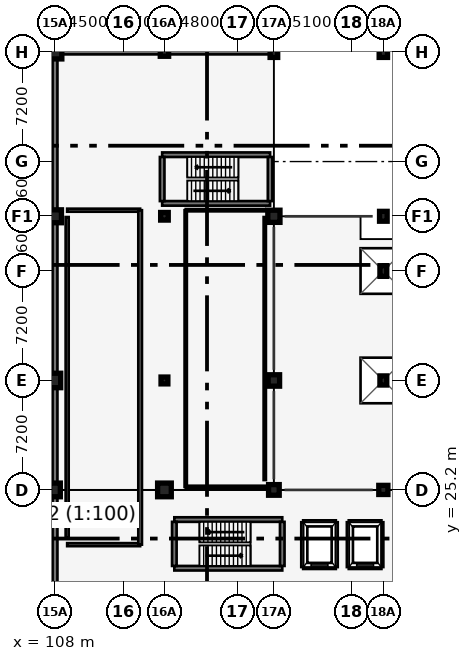
"""IFC4 building model, lengths in metres.
Left out: names, types, materials, properties, quantities, classifications, styles, units other than length and angle.
Written with IfcOpenShell. Run it as: python <this file> out.ifc"""

import sys

from ifc_helpers import new_model, si_unit, direction, frame, frame_2d, origin, origin_2d, place, context, subcontext, project, spatial, rectangle, circle, extrude, element, fill, save


model = new_model("IFC4")
c1 = context("Model", 3, precision=1e-05, world=origin(), true_north=direction((0.0, 1.0)))
c2 = subcontext(c1, "Body", "Model", "MODEL_VIEW")
j1 = project(units=[si_unit("LENGTHUNIT", "METRE"), si_unit("PLANEANGLEUNIT", "RADIAN")], contexts=[c1])
p1 = place(None, origin())
s1 = spatial("IfcSite", under=j1, at=p1, CompositionType="ELEMENT")
p2 = place(p1, origin())
s2 = spatial("IfcBuilding", under=s1, at=p2, CompositionType="ELEMENT")
p3 = place(p2, origin())
s3 = spatial("IfcBuildingStorey", under=s2, at=p3, CompositionType="ELEMENT", Elevation=0.0)
p4 = place(p3, frame((108.0, 25.2, 0.0), z_axis=(0.0, 0.0, 1.0), x_axis=(1.0, 0.0, 0.0)))
e1 = element("IfcColumn", 1, at=p4, inside=s3, PredefinedType="COLUMN", context=c2, shape_type="SweptSolid", body=[
    extrude(rectangle(XDim=0.7, YDim=0.9, at=origin_2d()), origin(), (0.0, 0.0, 1.0), 4.8),
])
p5 = place(p3, frame((108.0, 32.4, 0.0), z_axis=(0.0, 0.0, 1.0), x_axis=(1.0, 0.0, 0.0)))
e2 = element("IfcColumn", 2, at=p5, inside=s3, PredefinedType="COLUMN", context=c2, shape_type="SweptSolid", body=[
    extrude(rectangle(XDim=0.75, YDim=0.95, at=origin_2d()), origin(), (0.0, 0.0, 1.0), 4.8),
])
p6 = place(p3, frame((108.0, 43.2, 0.0), z_axis=(0.0, 0.0, 1.0), x_axis=(1.0, 0.0, 0.0)))
e3 = element("IfcColumn", 3, at=p6, inside=s3, PredefinedType="COLUMN", context=c2, shape_type="SweptSolid", body=[
    extrude(rectangle(XDim=0.85, YDim=0.85, at=origin_2d()), origin(), (0.0, 0.0, 1.0), 4.8),
])
p7 = place(p3, frame((108.0, 54.0, 0.0), z_axis=(0.0, 0.0, 1.0), x_axis=(1.0, 0.0, 0.0)))
e4 = element("IfcColumn", 4, at=p7, inside=s3, PredefinedType="COLUMN", context=c2, shape_type="SweptSolid", body=[
    extrude(rectangle(XDim=0.9, YDim=0.9, at=origin_2d()), origin(), (0.0, 0.0, 1.0), 4.8),
])
p8 = place(p3, frame((115.2, 25.2, 0.0), z_axis=(0.0, 0.0, 1.0), x_axis=(1.0, 0.0, 0.0)))
e5 = element("IfcColumn", 5, at=p8, inside=s3, PredefinedType="COLUMN", context=c2, shape_type="SweptSolid", body=[
    extrude(circle(Radius=0.45, at=origin_2d()), origin(), (0.0, 0.0, 1.0), 4.8),
])
p9 = place(p3, frame((115.2, 32.4, 0.0), z_axis=(0.0, 0.0, 1.0), x_axis=(1.0, 0.0, 0.0)))
e6 = element("IfcColumn", 6, at=p9, inside=s3, PredefinedType="COLUMN", context=c2, shape_type="SweptSolid", body=[
    extrude(rectangle(XDim=0.45, YDim=0.45, at=origin_2d()), origin(), (0.0, 0.0, 1.0), 4.8),
])
p10 = place(p3, frame((115.2, 43.2, 0.0), z_axis=(0.0, 0.0, 1.0), x_axis=(1.0, 0.0, 0.0)))
e7 = element("IfcColumn", 7, at=p10, inside=s3, PredefinedType="COLUMN", context=c2, shape_type="SweptSolid", body=[
    extrude(rectangle(XDim=0.5, YDim=0.5, at=origin_2d()), origin(), (0.0, 0.0, 1.0), 4.8),
])
p11 = place(p3, frame((115.2, 54.0, 0.0), z_axis=(0.0, 0.0, 1.0), x_axis=(1.0, 0.0, 0.0)))
e8 = element("IfcColumn", 8, at=p11, inside=s3, PredefinedType="COLUMN", context=c2, shape_type="SweptSolid", body=[
    extrude(rectangle(XDim=0.55, YDim=0.55, at=origin_2d()), origin(), (0.0, 0.0, 1.0), 4.8),
])
p12 = place(p3, frame((122.4, 25.2, 0.0), z_axis=(0.0, 0.0, 1.0), x_axis=(1.0, 0.0, 0.0)))
e9 = element("IfcColumn", 9, at=p12, inside=s3, PredefinedType="COLUMN", context=c2, shape_type="SweptSolid", body=[
    extrude(rectangle(XDim=0.7, YDim=0.7, at=origin_2d()), origin(), (0.0, 0.0, 1.0), 4.8),
])
p13 = place(p3, frame((122.4, 32.4, 0.0), z_axis=(0.0, 0.0, 1.0), x_axis=(1.0, 0.0, 0.0)))
e10 = element("IfcColumn", 10, at=p13, inside=s3, PredefinedType="COLUMN", context=c2, shape_type="SweptSolid", body=[
    extrude(rectangle(XDim=0.75, YDim=0.75, at=origin_2d()), origin(), (0.0, 0.0, 1.0), 4.8),
])
p14 = place(p3, frame((122.4, 43.2, 0.0), z_axis=(0.0, 0.0, 1.0), x_axis=(1.0, 0.0, 0.0)))
e11 = element("IfcColumn", 11, at=p14, inside=s3, PredefinedType="COLUMN", context=c2, shape_type="SweptSolid", body=[
    extrude(rectangle(XDim=0.8, YDim=0.8, at=origin_2d()), origin(), (0.0, 0.0, 1.0), 4.8),
])
p15 = place(p3, frame((122.4, 54.0, 0.0), z_axis=(0.0, 0.0, 1.0), x_axis=(1.0, 0.0, 0.0)))
e12 = element("IfcColumn", 12, at=p15, inside=s3, PredefinedType="COLUMN", context=c2, shape_type="SweptSolid", body=[
    extrude(rectangle(XDim=0.5, YDim=0.7, at=origin_2d()), origin(), (0.0, 0.0, 1.0), 4.8),
])
p16 = place(p3, frame((129.6, 25.2, 0.0), z_axis=(0.0, 0.0, 1.0), x_axis=(1.0, 0.0, 0.0)))
e13 = element("IfcColumn", 13, at=p16, inside=s3, PredefinedType="COLUMN", context=c2, shape_type="SweptSolid", body=[
    extrude(circle(Radius=0.3, at=origin_2d()), origin(), (0.0, 0.0, 1.0), 4.8),
])
p17 = place(p3, frame((129.6, 32.4, 0.0), z_axis=(0.0, 0.0, 1.0), x_axis=(1.0, 0.0, 0.0)))
e14 = element("IfcColumn", 14, at=p17, inside=s3, PredefinedType="COLUMN", context=c2, shape_type="SweptSolid", body=[
    extrude(rectangle(XDim=0.45, YDim=0.6, at=origin_2d()), origin(), (0.0, 0.0, 1.0), 4.8),
])
p18 = place(p3, frame((129.6, 39.6, 0.0), z_axis=(0.0, 0.0, 1.0), x_axis=(1.0, 0.0, 0.0)))
e15 = element("IfcColumn", 15, at=p18, inside=s3, PredefinedType="COLUMN", context=c2, shape_type="SweptSolid", body=[
    extrude(rectangle(XDim=0.45, YDim=0.7, at=origin_2d()), origin(), (0.0, 0.0, 1.0), 4.8),
])
p19 = place(p3, frame((129.6, 43.2, 0.0), z_axis=(0.0, 0.0, 1.0), x_axis=(1.0, 0.0, 0.0)))
e16 = element("IfcColumn", 16, at=p19, inside=s3, PredefinedType="COLUMN", context=c2, shape_type="SweptSolid", body=[
    extrude(rectangle(XDim=0.5, YDim=0.65, at=origin_2d()), origin(), (0.0, 0.0, 1.0), 4.8),
])
p20 = place(p3, frame((129.6, 54.0, 0.0), z_axis=(0.0, 0.0, 1.0), x_axis=(1.0, 0.0, 0.0)))
e17 = element("IfcColumn", 17, at=p20, inside=s3, PredefinedType="COLUMN", context=c2, shape_type="SweptSolid", body=[
    extrude(rectangle(XDim=0.55, YDim=0.7, at=origin_2d()), origin(), (0.0, 0.0, 1.0), 4.8),
])
p21 = place(p3, frame((108.0, 54.0, 0.0), z_axis=(0.0, 0.0, 1.0), x_axis=(0.0, -1.0, 0.0)))
e18 = element("IfcWall", 18, at=p21, inside=s3, PredefinedType="SOLIDWALL", context=c2, shape_type="SweptSolid", body=[
    extrude(rectangle(XDim=43.2, YDim=0.32, at=frame_2d((21.6, 0.0))), origin(), (0.0, 0.0, 1.0), 4.25),
])
p22 = place(p21, frame((2.2, 0.0, 0.72)))
e19 = element("IfcOpeningElement", 19, at=p22, cuts=e18, PredefinedType="OPENING", context=c2, shape_type="SweptSolid", body=[
    extrude(rectangle(XDim=1.2, YDim=2.0, at=frame_2d((0.6, 1.0))), frame((0.0, 0.17, 0.0), z_axis=(0.0, -1.0, 0.0), x_axis=(1.0, 0.0, 0.0)), (0.0, 0.0, 1.0), 0.34),
])
p23 = place(p21, frame((16.6, 0.0, 0.72)))
e20 = element("IfcOpeningElement", 20, at=p23, cuts=e18, PredefinedType="OPENING", context=c2, shape_type="SweptSolid", body=[
    extrude(rectangle(XDim=1.5, YDim=2.1, at=frame_2d((0.75, 1.05))), frame((0.0, 0.17, 0.0), z_axis=(0.0, -1.0, 0.0), x_axis=(1.0, 0.0, 0.0)), (0.0, 0.0, 1.0), 0.34),
])
p24 = place(p21, frame((23.8, 0.0, 0.72)))
e21 = element("IfcOpeningElement", 21, at=p24, cuts=e18, PredefinedType="OPENING", context=c2, shape_type="SweptSolid", body=[
    extrude(rectangle(XDim=1.65, YDim=2.1, at=frame_2d((0.825, 1.05))), frame((0.0, 0.17, 0.0), z_axis=(0.0, -1.0, 0.0), x_axis=(1.0, 0.0, 0.0)), (0.0, 0.0, 1.0), 0.34),
])
p25 = place(p21, frame((31.0, 0.0, 0.72)))
e22 = element("IfcOpeningElement", 22, at=p25, cuts=e18, PredefinedType="OPENING", context=c2, shape_type="SweptSolid", body=[
    extrude(rectangle(XDim=1.8, YDim=2.15, at=frame_2d((0.9, 1.075))), frame((0.0, 0.17, 0.0), z_axis=(0.0, -1.0, 0.0), x_axis=(1.0, 0.0, 0.0)), (0.0, 0.0, 1.0), 0.34),
])
p26 = place(p21, frame((6.2, 0.0, 0.0)))
e23 = element("IfcOpeningElement", 23, at=p26, cuts=e18, PredefinedType="OPENING", context=c2, shape_type="SweptSolid", body=[
    extrude(rectangle(XDim=2.0, YDim=2.35, at=frame_2d((1.0, 1.175))), frame((0.0, 0.17, 0.0), z_axis=(0.0, -1.0, 0.0), x_axis=(1.0, 0.0, 0.0)), (0.0, 0.0, 1.0), 0.34),
])
p27 = place(p3, frame((122.4, 54.0, 0.0), z_axis=(0.0, 0.0, 1.0), x_axis=(-1.0, 0.0, 0.0)))
e24 = element("IfcWall", 24, at=p27, inside=s3, PredefinedType="SOLIDWALL", context=c2, shape_type="SweptSolid", body=[
    extrude(rectangle(XDim=14.4, YDim=0.3, at=frame_2d((7.2, 0.0))), origin(), (0.0, 0.0, 1.0), 4.25),
])
p28 = place(p27, frame((2.2, 0.0, 0.78)))
e25 = element("IfcOpeningElement", 25, at=p28, cuts=e24, PredefinedType="OPENING", context=c2, shape_type="SweptSolid", body=[
    extrude(rectangle(XDim=1.1, YDim=1.65, at=frame_2d((0.55, 0.825))), frame((0.0, 0.16, 0.0), z_axis=(0.0, -1.0, 0.0), x_axis=(1.0, 0.0, 0.0)), (0.0, 0.0, 1.0), 0.32),
])
p29 = place(p3, frame((115.85, 20.05, 0.0), z_axis=(0.0, 0.0, 1.0), x_axis=(1.0, 0.0, 0.0)))
e26 = element("IfcWall", 26, at=p29, inside=s3, PredefinedType="SHEAR", context=c2, shape_type="SweptSolid", body=[
    extrude(rectangle(XDim=7.1, YDim=0.3, at=frame_2d((3.55, 0.0))), origin(), (0.0, 0.0, 1.0), 4.525),
])
p30 = place(p29, frame((0.35, 0.0, 0.0)))
e27 = element("IfcOpeningElement", 27, at=p30, cuts=e26, PredefinedType="OPENING", context=c2, shape_type="SweptSolid", body=[
    extrude(rectangle(XDim=1.05, YDim=2.15, at=frame_2d((0.525, 1.075))), frame((0.0, 0.16, 0.0), z_axis=(0.0, -1.0, 0.0), x_axis=(1.0, 0.0, 0.0)), (0.0, 0.0, 1.0), 0.32),
])
p31 = place(p3, frame((122.95, 23.25, 0.0), z_axis=(0.0, 0.0, 1.0), x_axis=(-1.0, 0.0, 0.0)))
e28 = element("IfcWall", 28, at=p31, inside=s3, PredefinedType="SHEAR", context=c2, shape_type="SweptSolid", body=[
    extrude(rectangle(XDim=7.1, YDim=0.3, at=frame_2d((3.55, 0.0))), origin(), (0.0, 0.0, 1.0), 4.525),
])
for number, where, z_axis, x_axis in (
    (29, (122.95, 20.2, 0.0), (0.0, 0.0, 1.0), (0.0, 1.0, 0.0)),
    (30, (115.85, 23.1, 0.0), (0.0, 0.0, 1.0), (0.0, -1.0, 0.0)),
):
    element("IfcWall", number, at=place(p3, frame(where, z_axis=z_axis, x_axis=x_axis)), inside=s3, PredefinedType="SHEAR", context=c2, shape_type="SweptSolid", body=[
        extrude(rectangle(XDim=2.9, YDim=0.3, at=frame_2d((1.45, 0.0))), origin(), (0.0, 0.0, 1.0), 4.525),
    ])
for number, where, z_axis, x_axis in (
    (31, (115.05, 44.05, 0.0), (0.0, 0.0, 1.0), (1.0, 0.0, 0.0)),
    (32, (122.15, 47.25, 0.0), (0.0, 0.0, 1.0), (-1.0, 0.0, 0.0)),
):
    element("IfcWall", number, at=place(p3, frame(where, z_axis=z_axis, x_axis=x_axis)), inside=s3, PredefinedType="SHEAR", context=c2, shape_type="SweptSolid", body=[
        extrude(rectangle(XDim=7.1, YDim=0.3, at=frame_2d((3.55, 0.0))), origin(), (0.0, 0.0, 1.0), 4.525),
    ])
p32 = place(p3, frame((122.15, 44.2, 0.0), z_axis=(0.0, 0.0, 1.0), x_axis=(0.0, 1.0, 0.0)))
e33 = element("IfcWall", 33, at=p32, inside=s3, PredefinedType="SHEAR", context=c2, shape_type="SweptSolid", body=[
    extrude(rectangle(XDim=2.9, YDim=0.3, at=frame_2d((1.45, 0.0))), origin(), (0.0, 0.0, 1.0), 4.525),
])
p33 = place(p3, frame((115.05, 47.1, 0.0), z_axis=(0.0, 0.0, 1.0), x_axis=(0.0, -1.0, 0.0)))
e34 = element("IfcWall", 34, at=p33, inside=s3, PredefinedType="SHEAR", context=c2, shape_type="SweptSolid", body=[
    extrude(rectangle(XDim=2.9, YDim=0.3, at=frame_2d((1.45, 0.0))), origin(), (0.0, 0.0, 1.0), 4.525),
])
p34 = place(p33, frame((0.75, 0.0, 0.0)))
e35 = element("IfcOpeningElement", 35, at=p34, cuts=e34, PredefinedType="OPENING", context=c2, shape_type="SweptSolid", body=[
    extrude(rectangle(XDim=1.05, YDim=2.15, at=frame_2d((0.525, 1.075))), frame((0.0, 0.16, 0.0), z_axis=(0.0, -1.0, 0.0), x_axis=(1.0, 0.0, 0.0)), (0.0, 0.0, 1.0), 0.32),
])
p35 = place(p3, frame((124.325, 20.125, 0.0), z_axis=(0.0, 0.0, 1.0), x_axis=(1.0, 0.0, 0.0)))
e36 = element("IfcWall", 36, at=p35, inside=s3, PredefinedType="SHEAR", context=c2, shape_type="SweptSolid", body=[
    extrude(rectangle(XDim=2.15, YDim=0.25, at=frame_2d((1.075, 0.0))), origin(), (0.0, 0.0, 1.0), 4.5),
])
p36 = place(p3, frame((126.475, 23.075, 0.0), z_axis=(0.0, 0.0, 1.0), x_axis=(-1.0, 0.0, 0.0)))
e37 = element("IfcWall", 37, at=p36, inside=s3, PredefinedType="SHEAR", context=c2, shape_type="SweptSolid", body=[
    extrude(rectangle(XDim=2.15, YDim=0.25, at=frame_2d((1.075, 0.0))), origin(), (0.0, 0.0, 1.0), 4.5),
])
p37 = place(p36, frame((0.525, 0.0, 0.0)))
e38 = element("IfcOpeningElement", 38, at=p37, cuts=e37, PredefinedType="OPENING", context=c2, shape_type="SweptSolid", body=[
    extrude(rectangle(XDim=1.1, YDim=2.15, at=frame_2d((0.55, 1.075))), frame((0.0, 0.135, 0.0), z_axis=(0.0, -1.0, 0.0), x_axis=(1.0, 0.0, 0.0)), (0.0, 0.0, 1.0), 0.27),
])
for number, where, z_axis, x_axis in (
    (39, (124.325, 23.075, 0.0), (0.0, 0.0, 1.0), (0.0, -1.0, 0.0)),
    (40, (126.475, 20.125, 0.0), (0.0, 0.0, 1.0), (0.0, 1.0, 0.0)),
):
    element("IfcWall", number, at=place(p3, frame(where, z_axis=z_axis, x_axis=x_axis)), inside=s3, PredefinedType="SHEAR", context=c2, shape_type="SweptSolid", body=[
        extrude(rectangle(XDim=2.95, YDim=0.25, at=frame_2d((1.475, 0.0))), origin(), (0.0, 0.0, 1.0), 4.5),
    ])
p38 = place(p3, frame((127.325, 20.125, 0.0), z_axis=(0.0, 0.0, 1.0), x_axis=(1.0, 0.0, 0.0)))
e41 = element("IfcWall", 41, at=p38, inside=s3, PredefinedType="SHEAR", context=c2, shape_type="SweptSolid", body=[
    extrude(rectangle(XDim=2.15, YDim=0.25, at=frame_2d((1.075, 0.0))), origin(), (0.0, 0.0, 1.0), 4.5),
])
p39 = place(p3, frame((129.475, 23.075, 0.0), z_axis=(0.0, 0.0, 1.0), x_axis=(-1.0, 0.0, 0.0)))
e42 = element("IfcWall", 42, at=p39, inside=s3, PredefinedType="SHEAR", context=c2, shape_type="SweptSolid", body=[
    extrude(rectangle(XDim=2.15, YDim=0.25, at=frame_2d((1.075, 0.0))), origin(), (0.0, 0.0, 1.0), 4.5),
])
p40 = place(p39, frame((0.525, 0.0, 0.0)))
e43 = element("IfcOpeningElement", 43, at=p40, cuts=e42, PredefinedType="OPENING", context=c2, shape_type="SweptSolid", body=[
    extrude(rectangle(XDim=1.1, YDim=2.15, at=frame_2d((0.55, 1.075))), frame((0.0, 0.135, 0.0), z_axis=(0.0, -1.0, 0.0), x_axis=(1.0, 0.0, 0.0)), (0.0, 0.0, 1.0), 0.27),
])
for number, where, z_axis, x_axis in (
    (44, (127.325, 23.075, 0.0), (0.0, 0.0, 1.0), (0.0, -1.0, 0.0)),
    (45, (129.475, 20.125, 0.0), (0.0, 0.0, 1.0), (0.0, 1.0, 0.0)),
):
    element("IfcWall", number, at=place(p3, frame(where, z_axis=z_axis, x_axis=x_axis)), inside=s3, PredefinedType="SHEAR", context=c2, shape_type="SweptSolid", body=[
        extrude(rectangle(XDim=2.95, YDim=0.25, at=frame_2d((1.475, 0.0))), origin(), (0.0, 0.0, 1.0), 4.5),
    ])
for number, where, z_axis, x_axis in (
    (46, (108.8, 43.6, 0.0), (0.0, 0.0, 1.0), (1.0, 0.0, 0.0)),
    (47, (113.6, 21.6, 0.0), (0.0, 0.0, 1.0), (-1.0, 0.0, 0.0)),
):
    element("IfcWall", number, at=place(p3, frame(where, z_axis=z_axis, x_axis=x_axis)), inside=s3, PredefinedType="SOLIDWALL", context=c2, shape_type="SweptSolid", body=[
        extrude(rectangle(XDim=4.8, YDim=0.2, at=frame_2d((2.4, 0.0))), origin(), (0.0, 0.0, 1.0), 4.0),
    ])
p41 = place(p3, frame((108.8, 43.15, 0.0), z_axis=(0.0, 0.0, 1.0), x_axis=(0.0, -1.0, 0.0)))
e48 = element("IfcWall", 48, at=p41, inside=s3, PredefinedType="SOLIDWALL", context=c2, shape_type="SweptSolid", body=[
    extrude(rectangle(XDim=21.1, YDim=0.2, at=frame_2d((10.55, 0.0))), origin(), (0.0, 0.0, 1.0), 3.807),
])
p42 = place(p3, frame((113.6, 21.6, 0.0), z_axis=(0.0, 0.0, 1.0), x_axis=(0.0, 1.0, 0.0)))
e49 = element("IfcWall", 49, at=p42, inside=s3, PredefinedType="SOLIDWALL", context=c2, shape_type="SweptSolid", body=[
    extrude(rectangle(XDim=22.0, YDim=0.24, at=frame_2d((11.0, 0.0))), origin(), (0.0, 0.0, 1.0), 3.807),
])
p43 = place(p42, frame((6.12, 0.0, 0.0)))
e50 = element("IfcOpeningElement", 50, at=p43, cuts=e49, PredefinedType="OPENING", context=c2, shape_type="SweptSolid", body=[
    extrude(rectangle(XDim=1.6, YDim=2.15, at=frame_2d((0.8, 1.075))), frame((0.0, 0.13, 0.0), z_axis=(0.0, -1.0, 0.0), x_axis=(1.0, 0.0, 0.0)), (0.0, 0.0, 1.0), 0.26),
])
for number, where, z_axis, x_axis in (
    (51, (116.6, 43.6, 0.0), (0.0, 0.0, 1.0), (1.0, 0.0, 0.0)),
    (52, (121.8, 25.4, 0.0), (0.0, 0.0, 1.0), (-1.0, 0.0, 0.0)),
):
    element("IfcWall", number, at=place(p3, frame(where, z_axis=z_axis, x_axis=x_axis)), inside=s3, PredefinedType="PARTITIONING", context=c2, shape_type="SweptSolid", body=[
        extrude(rectangle(XDim=5.2, YDim=0.15, at=frame_2d((2.6, 0.0))), origin(), (0.0, 0.0, 1.0), 4.0),
    ])
p44 = place(p3, frame((121.8, 25.85, 0.0), z_axis=(0.0, 0.0, 1.0), x_axis=(0.0, 1.0, 0.0)))
e53 = element("IfcWall", 53, at=p44, inside=s3, PredefinedType="PARTITIONING", context=c2, shape_type="SweptSolid", body=[
    extrude(rectangle(XDim=17.3, YDim=0.15, at=frame_2d((8.65, 0.0))), origin(), (0.0, 0.0, 1.0), 3.807),
])
p45 = place(p3, frame((116.6, 43.6, 0.0), z_axis=(0.0, 0.0, 1.0), x_axis=(0.0, -1.0, 0.0)))
e54 = element("IfcWall", 54, at=p45, inside=s3, PredefinedType="PARTITIONING", context=c2, shape_type="SweptSolid", body=[
    extrude(rectangle(XDim=18.2, YDim=0.15, at=frame_2d((9.1, 0.0))), origin(), (0.0, 0.0, 1.0), 3.807),
])
p46 = place(p45, frame((8.615, 0.0, 0.0)))
e55 = element("IfcOpeningElement", 55, at=p46, cuts=e54, PredefinedType="OPENING", context=c2, shape_type="SweptSolid", body=[
    extrude(rectangle(XDim=0.97, YDim=2.15, at=frame_2d((0.485, 1.075))), frame((0.0, 0.085, 0.0), z_axis=(0.0, -1.0, 0.0), x_axis=(1.0, 0.0, 0.0)), (0.0, 0.0, 1.0), 0.17),
])
p47 = place(p22, origin())
e56 = element("IfcWindow", 56, at=p47, inside=s3, PartitioningType="SINGLE_PANEL", PredefinedType="WINDOW", context=c2, shape_type="SweptSolid", body=[
    extrude(rectangle(XDim=1.2, YDim=2.0, at=frame_2d((0.6, 1.0))), frame((0.0, 0.03, 0.0), z_axis=(0.0, -1.0, 0.0), x_axis=(1.0, 0.0, 0.0)), (0.0, 0.0, 1.0), 0.06),
])
fill(e19, e56)
p48 = place(p23, origin())
e57 = element("IfcWindow", 57, at=p48, inside=s3, PartitioningType="SINGLE_PANEL", PredefinedType="WINDOW", context=c2, shape_type="SweptSolid", body=[
    extrude(rectangle(XDim=1.5, YDim=2.1, at=frame_2d((0.75, 1.05))), frame((0.0, 0.03, 0.0), z_axis=(0.0, -1.0, 0.0), x_axis=(1.0, 0.0, 0.0)), (0.0, 0.0, 1.0), 0.06),
])
fill(e20, e57)
p49 = place(p24, origin())
e58 = element("IfcWindow", 58, at=p49, inside=s3, PartitioningType="SINGLE_PANEL", PredefinedType="WINDOW", context=c2, shape_type="SweptSolid", body=[
    extrude(rectangle(XDim=1.65, YDim=2.1, at=frame_2d((0.825, 1.05))), frame((0.0, 0.03, 0.0), z_axis=(0.0, -1.0, 0.0), x_axis=(1.0, 0.0, 0.0)), (0.0, 0.0, 1.0), 0.06),
])
fill(e21, e58)
p50 = place(p25, origin())
e59 = element("IfcWindow", 59, at=p50, inside=s3, PartitioningType="SINGLE_PANEL", PredefinedType="WINDOW", context=c2, shape_type="SweptSolid", body=[
    extrude(rectangle(XDim=1.8, YDim=2.15, at=frame_2d((0.9, 1.075))), frame((0.0, 0.03, 0.0), z_axis=(0.0, -1.0, 0.0), x_axis=(1.0, 0.0, 0.0)), (0.0, 0.0, 1.0), 0.06),
])
fill(e22, e59)
p51 = place(p26, frame((2.0, 0.0, 0.0), z_axis=(0.0, 0.0, 1.0), x_axis=(-1.0, 0.0, 0.0)))
e60 = element("IfcDoor", 60, at=p51, inside=s3, OperationType="DOUBLE_SWING_LEFT", PredefinedType="DOOR", context=c2, shape_type="SweptSolid", body=[
    extrude(rectangle(XDim=2.0, YDim=2.35, at=frame_2d((1.0, 1.175))), frame((0.0, 0.025, 0.0), z_axis=(0.0, -1.0, 0.0), x_axis=(1.0, 0.0, 0.0)), (0.0, 0.0, 1.0), 0.05),
])
fill(e23, e60)
p52 = place(p28, origin())
e61 = element("IfcWindow", 61, at=p52, inside=s3, PartitioningType="SINGLE_PANEL", PredefinedType="WINDOW", context=c2, shape_type="SweptSolid", body=[
    extrude(rectangle(XDim=1.1, YDim=1.65, at=frame_2d((0.55, 0.825))), frame((0.0, 0.03, 0.0), z_axis=(0.0, -1.0, 0.0), x_axis=(1.0, 0.0, 0.0)), (0.0, 0.0, 1.0), 0.06),
])
fill(e25, e61)
p53 = place(p30, frame((1.05, 0.0, 0.0), z_axis=(0.0, 0.0, 1.0), x_axis=(-1.0, 0.0, 0.0)))
e62 = element("IfcDoor", 62, at=p53, inside=s3, OperationType="SINGLE_SWING_LEFT", PredefinedType="DOOR", context=c2, shape_type="SweptSolid", body=[
    extrude(rectangle(XDim=1.05, YDim=2.15, at=frame_2d((0.525, 1.075))), frame((0.0, 0.025, 0.0), z_axis=(0.0, -1.0, 0.0), x_axis=(1.0, 0.0, 0.0)), (0.0, 0.0, 1.0), 0.05),
])
fill(e27, e62)
p54 = place(p34, frame((1.05, 0.0, 0.0), z_axis=(0.0, 0.0, 1.0), x_axis=(-1.0, 0.0, 0.0)))
e63 = element("IfcDoor", 63, at=p54, inside=s3, OperationType="SINGLE_SWING_LEFT", PredefinedType="DOOR", context=c2, shape_type="SweptSolid", body=[
    extrude(rectangle(XDim=1.05, YDim=2.15, at=frame_2d((0.525, 1.075))), frame((0.0, 0.025, 0.0), z_axis=(0.0, -1.0, 0.0), x_axis=(1.0, 0.0, 0.0)), (0.0, 0.0, 1.0), 0.05),
])
fill(e35, e63)
p55 = place(p37, origin())
e64 = element("IfcDoor", 64, at=p55, inside=s3, OperationType="SLIDING_TO_LEFT", PredefinedType="DOOR", context=c2, shape_type="SweptSolid", body=[
    extrude(rectangle(XDim=1.1, YDim=2.15, at=frame_2d((0.55, 1.075))), frame((0.0, 0.025, 0.0), z_axis=(0.0, -1.0, 0.0), x_axis=(1.0, 0.0, 0.0)), (0.0, 0.0, 1.0), 0.05),
])
fill(e38, e64)
p56 = place(p40, origin())
e65 = element("IfcDoor", 65, at=p56, inside=s3, OperationType="SLIDING_TO_LEFT", PredefinedType="DOOR", context=c2, shape_type="SweptSolid", body=[
    extrude(rectangle(XDim=1.1, YDim=2.15, at=frame_2d((0.55, 1.075))), frame((0.0, 0.025, 0.0), z_axis=(0.0, -1.0, 0.0), x_axis=(1.0, 0.0, 0.0)), (0.0, 0.0, 1.0), 0.05),
])
fill(e43, e65)
p57 = place(p43, origin())
e66 = element("IfcDoor", 66, at=p57, inside=s3, OperationType="DOUBLE_SWING_RIGHT", PredefinedType="DOOR", context=c2, shape_type="SweptSolid", body=[
    extrude(rectangle(XDim=1.6, YDim=2.15, at=frame_2d((0.8, 1.075))), frame((0.0, 0.025, 0.0), z_axis=(0.0, -1.0, 0.0), x_axis=(1.0, 0.0, 0.0)), (0.0, 0.0, 1.0), 0.05),
])
fill(e50, e66)
p58 = place(p46, origin())
e67 = element("IfcDoor", 67, at=p58, inside=s3, OperationType="SINGLE_SWING_RIGHT", PredefinedType="DOOR", context=c2, shape_type="SweptSolid", body=[
    extrude(rectangle(XDim=0.97, YDim=2.15, at=frame_2d((0.485, 1.075))), frame((0.0, 0.025, 0.0), z_axis=(0.0, -1.0, 0.0), x_axis=(1.0, 0.0, 0.0)), (0.0, 0.0, 1.0), 0.05),
])
fill(e55, e67)
save(model, sys.argv[1])
